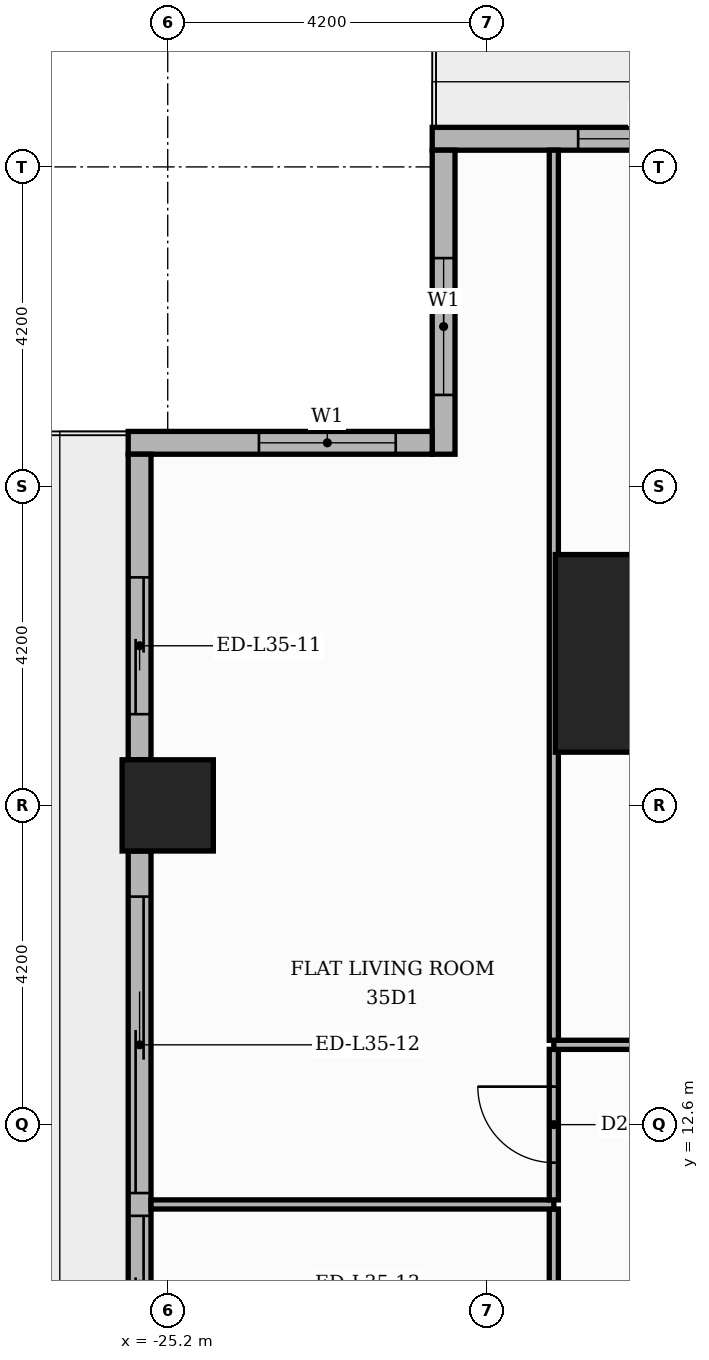
"""IFC4 building model, lengths in metres.
Left out: names, types, materials, properties, quantities, classifications, styles, units other than length and angle.
Written with IfcOpenShell. Run it as: python <this file> out.ifc"""

import sys

from ifc_helpers import new_model, si_unit, direction, frame, frame_2d, origin, origin_2d, place, context, subcontext, project, spatial, rectangle, extrude, element, fill, save


model = new_model("IFC4")
c1 = context("Model", 3, precision=1e-05, world=origin(), true_north=direction((0.0, 1.0)))
c2 = subcontext(c1, "Body", "Model", "MODEL_VIEW")
j1 = project(units=[si_unit("LENGTHUNIT", "METRE"), si_unit("PLANEANGLEUNIT", "RADIAN")], contexts=[c1])
p1 = place(None, origin())
s1 = spatial("IfcSite", under=j1, at=p1, CompositionType="ELEMENT")
p2 = place(p1, origin())
s2 = spatial("IfcBuilding", under=s1, at=p2, CompositionType="ELEMENT")
p3 = place(p2, frame((0.0, 0.0, 149.4)))
s3 = spatial("IfcBuildingStorey", under=s2, at=p3, CompositionType="ELEMENT", Elevation=149.4)
p4 = place(p3, frame((-18.8, 18.8, 0.0), z_axis=(0.0, 0.0, 1.0), x_axis=(1.0, 0.0, 0.0)))
e1 = element("IfcColumn", 1, at=p4, inside=s3, PredefinedType="COLUMN", context=c2, shape_type="SweptSolid", body=[
    extrude(rectangle(XDim=2.6, YDim=2.6, at=origin_2d()), origin(), (0.0, 0.0, 1.0), 3.9),
])
p5 = place(p3, frame((-25.2, 16.8, 0.0), z_axis=(0.0, 0.0, 1.0), x_axis=(1.0, 0.0, 0.0)))
e2 = element("IfcColumn", 2, at=p5, inside=s3, PredefinedType="COLUMN", context=c2, shape_type="SweptSolid", body=[
    extrude(rectangle(XDim=1.2, YDim=1.2, at=origin_2d()), origin(), (0.0, 0.0, 1.0), 3.9),
])
p6 = place(p3, frame((-17.4, 25.57, 0.0), z_axis=(0.0, 0.0, 1.0), x_axis=(-1.0, 0.0, 0.0)))
e3 = element("IfcWall", 3, at=p6, inside=s3, PredefinedType="STANDARD", context=c2, shape_type="SweptSolid", body=[
    extrude(rectangle(XDim=4.32, YDim=0.3, at=frame_2d((2.16, 0.0))), origin(), (0.0, 0.0, 1.0), 3.48),
])
p7 = place(p6, frame((0.6, 0.0, 0.9)))
e4 = element("IfcOpeningElement", 4, at=p7, cuts=e3, PredefinedType="OPENING", context=c2, shape_type="SweptSolid", body=[
    extrude(rectangle(XDim=1.8, YDim=2.1, at=frame_2d((0.9, 1.05))), frame((0.0, 0.16, 0.0), z_axis=(0.0, -1.0, 0.0), x_axis=(1.0, 0.0, 0.0)), (0.0, 0.0, 1.0), 0.32),
])
p8 = place(p3, frame((-21.57, 25.42, 0.0), z_axis=(0.0, 0.0, 1.0), x_axis=(0.0, -1.0, 0.0)))
e5 = element("IfcWall", 5, at=p8, inside=s3, PredefinedType="STANDARD", context=c2, shape_type="SweptSolid", body=[
    extrude(rectangle(XDim=4.0, YDim=0.3, at=frame_2d((2.0, 0.0))), origin(), (0.0, 0.0, 1.0), 3.48),
])
p9 = place(p8, frame((1.42, 0.0, 0.9)))
e6 = element("IfcOpeningElement", 6, at=p9, cuts=e5, PredefinedType="OPENING", context=c2, shape_type="SweptSolid", body=[
    extrude(rectangle(XDim=1.8, YDim=2.1, at=frame_2d((0.9, 1.05))), frame((0.0, 0.16, 0.0), z_axis=(0.0, -1.0, 0.0), x_axis=(1.0, 0.0, 0.0)), (0.0, 0.0, 1.0), 0.32),
])
p10 = place(p3, frame((-21.72, 21.57, 0.0), z_axis=(0.0, 0.0, 1.0), x_axis=(-1.0, 0.0, 0.0)))
e7 = element("IfcWall", 7, at=p10, inside=s3, PredefinedType="STANDARD", context=c2, shape_type="SweptSolid", body=[
    extrude(rectangle(XDim=4.0, YDim=0.3, at=frame_2d((2.0, 0.0))), origin(), (0.0, 0.0, 1.0), 3.48),
])
p11 = place(p10, frame((0.48, 0.0, 0.9)))
e8 = element("IfcOpeningElement", 8, at=p11, cuts=e7, PredefinedType="OPENING", context=c2, shape_type="SweptSolid", body=[
    extrude(rectangle(XDim=1.8, YDim=2.1, at=frame_2d((0.9, 1.05))), frame((0.0, 0.16, 0.0), z_axis=(0.0, -1.0, 0.0), x_axis=(1.0, 0.0, 0.0)), (0.0, 0.0, 1.0), 0.32),
])
p12 = place(p3, frame((-25.57, 21.42, 0.0), z_axis=(0.0, 0.0, 1.0), x_axis=(0.0, -1.0, 0.0)))
e9 = element("IfcWall", 9, at=p12, inside=s3, PredefinedType="STANDARD", context=c2, shape_type="SweptSolid", body=[
    extrude(rectangle(XDim=4.02, YDim=0.3, at=frame_2d((2.01, 0.0))), origin(), (0.0, 0.0, 1.0), 3.48),
])
p13 = place(p12, frame((1.62, 0.0, 0.0)))
e10 = element("IfcOpeningElement", 10, at=p13, cuts=e9, PredefinedType="OPENING", context=c2, shape_type="SweptSolid", body=[
    extrude(rectangle(XDim=1.8, YDim=2.4, at=frame_2d((0.9, 1.2))), frame((0.0, 0.16, 0.0), z_axis=(0.0, -1.0, 0.0), x_axis=(1.0, 0.0, 0.0)), (0.0, 0.0, 1.0), 0.32),
])
p14 = place(p3, frame((-25.57, 16.2, 0.0), z_axis=(0.0, 0.0, 1.0), x_axis=(0.0, -1.0, 0.0)))
e11 = element("IfcWall", 11, at=p14, inside=s3, PredefinedType="STANDARD", context=c2, shape_type="SweptSolid", body=[
    extrude(rectangle(XDim=7.2, YDim=0.3, at=frame_2d((3.6, 0.0))), origin(), (0.0, 0.0, 1.0), 3.48),
])
p15 = place(p14, frame((0.6, 0.0, 0.0)))
e12 = element("IfcOpeningElement", 12, at=p15, cuts=e11, PredefinedType="OPENING", context=c2, shape_type="SweptSolid", body=[
    extrude(rectangle(XDim=3.9, YDim=2.4, at=frame_2d((1.95, 1.2))), frame((0.0, 0.16, 0.0), z_axis=(0.0, -1.0, 0.0), x_axis=(1.0, 0.0, 0.0)), (0.0, 0.0, 1.0), 0.32),
])
p16 = place(p14, frame((4.8, 0.0, 0.0)))
e13 = element("IfcOpeningElement", 13, at=p16, cuts=e11, PredefinedType="OPENING", context=c2, shape_type="SweptSolid", body=[
    extrude(rectangle(XDim=1.8, YDim=2.4, at=frame_2d((0.9, 1.2))), frame((0.0, 0.16, 0.0), z_axis=(0.0, -1.0, 0.0), x_axis=(1.0, 0.0, 0.0)), (0.0, 0.0, 1.0), 0.32),
])
p17 = place(p3, frame((-20.12, 3.21, 0.0), z_axis=(0.0, 0.0, 1.0), x_axis=(0.0, 1.0, 0.0)))
e14 = element("IfcWall", 14, at=p17, inside=s3, PredefinedType="PARTITIONING", context=c2, shape_type="SweptSolid", body=[
    extrude(rectangle(XDim=8.28, YDim=0.12, at=frame_2d((4.14, 0.0))), origin(), (0.0, 0.0, 1.0), 3.48),
])
p18 = place(p17, frame((3.69, 0.0, 0.0)))
e15 = element("IfcOpeningElement", 15, at=p18, cuts=e14, PredefinedType="OPENING", context=c2, shape_type="SweptSolid", body=[
    extrude(rectangle(XDim=0.9, YDim=2.1, at=frame_2d((0.45, 1.05))), frame((0.0, 0.07, 0.0), z_axis=(0.0, -1.0, 0.0), x_axis=(1.0, 0.0, 0.0)), (0.0, 0.0, 1.0), 0.14),
])
p19 = place(p3, frame((-25.42, 11.55, 0.0), z_axis=(0.0, 0.0, 1.0), x_axis=(1.0, 0.0, 0.0)))
e16 = element("IfcWall", 16, at=p19, inside=s3, PredefinedType="PARTITIONING", context=c2, shape_type="SweptSolid", body=[
    extrude(rectangle(XDim=5.3, YDim=0.12, at=frame_2d((2.65, 0.0))), origin(), (0.0, 0.0, 1.0), 3.48),
])
p20 = place(p3, frame((-20.12, 11.61, 0.0), z_axis=(0.0, 0.0, 1.0), x_axis=(0.0, 1.0, 0.0)))
e17 = element("IfcWall", 17, at=p20, inside=s3, PredefinedType="PARTITIONING", context=c2, shape_type="SweptSolid", body=[
    extrude(rectangle(XDim=1.98, YDim=0.12, at=frame_2d((0.99, 0.0))), origin(), (0.0, 0.0, 1.0), 3.48),
])
p21 = place(p20, frame((0.49, 0.0, 0.0)))
e18 = element("IfcOpeningElement", 18, at=p21, cuts=e17, PredefinedType="OPENING", context=c2, shape_type="SweptSolid", body=[
    extrude(rectangle(XDim=1.0, YDim=2.1, at=frame_2d((0.5, 1.05))), frame((0.0, 0.07, 0.0), z_axis=(0.0, -1.0, 0.0), x_axis=(1.0, 0.0, 0.0)), (0.0, 0.0, 1.0), 0.14),
])
p22 = place(p3, frame((-20.12, 13.65, 0.0), z_axis=(0.0, 0.0, 1.0), x_axis=(1.0, 0.0, 0.0)))
e19 = element("IfcWall", 19, at=p22, inside=s3, PredefinedType="PARTITIONING", context=c2, shape_type="SweptSolid", body=[
    extrude(rectangle(XDim=6.47, YDim=0.12, at=frame_2d((3.235, 0.0))), origin(), (0.0, 0.0, 1.0), 3.48),
])
p23 = place(p22, frame((2.785, 0.0, 0.0)))
e20 = element("IfcOpeningElement", 20, at=p23, cuts=e19, PredefinedType="OPENING", context=c2, shape_type="SweptSolid", body=[
    extrude(rectangle(XDim=0.9, YDim=2.1, at=frame_2d((0.45, 1.05))), frame((0.0, 0.07, 0.0), z_axis=(0.0, -1.0, 0.0), x_axis=(1.0, 0.0, 0.0)), (0.0, 0.0, 1.0), 0.14),
])
p24 = place(p3, frame((-20.12, 13.71, 0.0), z_axis=(0.0, 0.0, 1.0), x_axis=(0.0, 1.0, 0.0)))
e21 = element("IfcWall", 21, at=p24, inside=s3, PredefinedType="PARTITIONING", context=c2, shape_type="SweptSolid", body=[
    extrude(rectangle(XDim=11.71, YDim=0.12, at=frame_2d((5.855, 0.0))), origin(), (0.0, 0.0, 1.0), 3.48),
])
p25 = place(p7, origin())
e22 = element("IfcWindow", 22, at=p25, inside=s3, PartitioningType="SINGLE_PANEL", PredefinedType="WINDOW", context=c2, shape_type="SweptSolid", body=[
    extrude(rectangle(XDim=1.8, YDim=2.1, at=frame_2d((0.9, 1.05))), frame((0.0, 0.03, 0.0), z_axis=(0.0, -1.0, 0.0), x_axis=(1.0, 0.0, 0.0)), (0.0, 0.0, 1.0), 0.06),
])
fill(e4, e22)
p26 = place(p9, origin())
e23 = element("IfcWindow", 23, at=p26, inside=s3, PartitioningType="SINGLE_PANEL", PredefinedType="WINDOW", context=c2, shape_type="SweptSolid", body=[
    extrude(rectangle(XDim=1.8, YDim=2.1, at=frame_2d((0.9, 1.05))), frame((0.0, 0.03, 0.0), z_axis=(0.0, -1.0, 0.0), x_axis=(1.0, 0.0, 0.0)), (0.0, 0.0, 1.0), 0.06),
])
fill(e6, e23)
p27 = place(p11, origin())
e24 = element("IfcWindow", 24, at=p27, inside=s3, PartitioningType="SINGLE_PANEL", PredefinedType="WINDOW", context=c2, shape_type="SweptSolid", body=[
    extrude(rectangle(XDim=1.8, YDim=2.1, at=frame_2d((0.9, 1.05))), frame((0.0, 0.03, 0.0), z_axis=(0.0, -1.0, 0.0), x_axis=(1.0, 0.0, 0.0)), (0.0, 0.0, 1.0), 0.06),
])
fill(e8, e24)
p28 = place(p13, origin())
e25 = element("IfcDoor", 25, at=p28, inside=s3, OperationType="SLIDING_TO_RIGHT", PredefinedType="DOOR", context=c2, shape_type="SweptSolid", body=[
    extrude(rectangle(XDim=1.8, YDim=2.4, at=frame_2d((0.9, 1.2))), frame((0.0, 0.025, 0.0), z_axis=(0.0, -1.0, 0.0), x_axis=(1.0, 0.0, 0.0)), (0.0, 0.0, 1.0), 0.05),
])
fill(e10, e25)
p29 = place(p15, origin())
e26 = element("IfcDoor", 26, at=p29, inside=s3, OperationType="SLIDING_TO_LEFT", PredefinedType="DOOR", context=c2, shape_type="SweptSolid", body=[
    extrude(rectangle(XDim=3.9, YDim=2.4, at=frame_2d((1.95, 1.2))), frame((0.0, 0.025, 0.0), z_axis=(0.0, -1.0, 0.0), x_axis=(1.0, 0.0, 0.0)), (0.0, 0.0, 1.0), 0.05),
])
fill(e12, e26)
p30 = place(p16, origin())
e27 = element("IfcDoor", 27, at=p30, inside=s3, OperationType="SLIDING_TO_RIGHT", PredefinedType="DOOR", context=c2, shape_type="SweptSolid", body=[
    extrude(rectangle(XDim=1.8, YDim=2.4, at=frame_2d((0.9, 1.2))), frame((0.0, 0.025, 0.0), z_axis=(0.0, -1.0, 0.0), x_axis=(1.0, 0.0, 0.0)), (0.0, 0.0, 1.0), 0.05),
])
fill(e13, e27)
p31 = place(p21, origin())
e28 = element("IfcDoor", 28, at=p31, inside=s3, OperationType="SINGLE_SWING_RIGHT", PredefinedType="DOOR", context=c2, shape_type="SweptSolid", body=[
    extrude(rectangle(XDim=1.0, YDim=2.1, at=frame_2d((0.5, 1.05))), frame((0.0, 0.025, 0.0), z_axis=(0.0, -1.0, 0.0), x_axis=(1.0, 0.0, 0.0)), (0.0, 0.0, 1.0), 0.05),
])
fill(e18, e28)
save(model, sys.argv[1])
